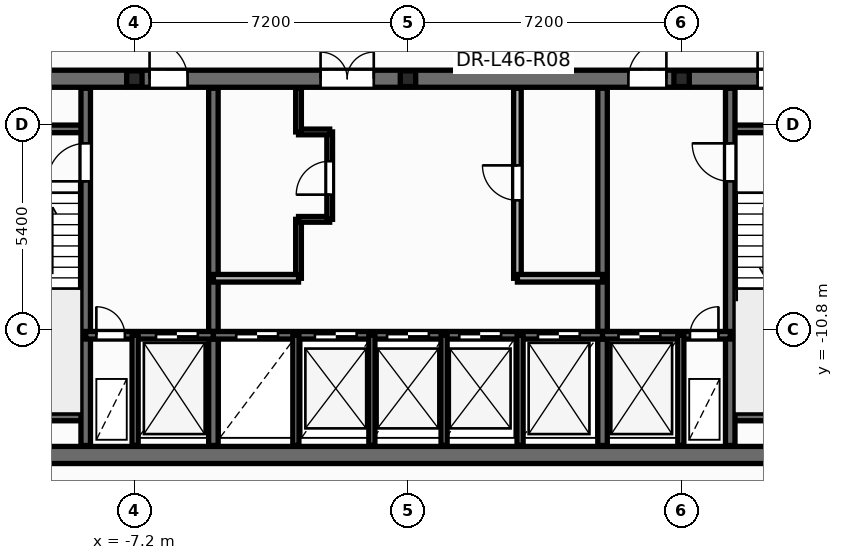
"""IFC4 building model, lengths in metres.
Left out: names, types, materials, properties, quantities, classifications, styles, units other than length and angle.
Written with IfcOpenShell. Run it as: python <this file> out.ifc"""

import sys

from ifc_helpers import new_model, si_unit, direction, frame, frame_2d, origin, origin_2d, place, context, subcontext, project, spatial, rectangle, i_section, extrude, element, fill, save


model = new_model("IFC4")
c1 = context("Model", 3, precision=1e-05, world=origin(), true_north=direction((0.0, 1.0)))
c2 = subcontext(c1, "Body", "Model", "MODEL_VIEW")
j1 = project(units=[si_unit("LENGTHUNIT", "METRE"), si_unit("PLANEANGLEUNIT", "RADIAN")], contexts=[c1])
p1 = place(None, origin())
s1 = spatial("IfcSite", under=j1, at=p1, CompositionType="ELEMENT")
p2 = place(p1, origin())
s2 = spatial("IfcBuilding", under=s1, at=p2, CompositionType="ELEMENT")
p3 = place(p2, frame((0.0, 0.0, 178.5)))
s3 = spatial("IfcBuildingStorey", under=s2, at=p3, CompositionType="ELEMENT", Elevation=178.5)
for number, where, z_axis, x_axis in (
    (1, (-7.2, -4.2, 0.0), (0.0, 0.0, 1.0), (1.0, 0.0, 0.0)),
    (2, (0.0, -4.2, 0.0), (0.0, 0.0, 1.0), (1.0, 0.0, 0.0)),
    (3, (7.2, -4.2, 0.0), (0.0, 0.0, 1.0), (1.0, 0.0, 0.0)),
):
    element("IfcColumn", number, at=place(p3, frame(where, z_axis=z_axis, x_axis=x_axis)), inside=s3, PredefinedType="PILASTER", context=c2, shape_type="SweptSolid", body=[
        extrude(i_section(OverallWidth=0.405, OverallDepth=0.414, WebThickness=0.022, FlangeThickness=0.032, at=origin_2d()), origin(), (0.0, 0.0, 1.0), 3.6),
    ])
p4 = place(p3, frame((-2.88, -9.45, 0.0), z_axis=(0.0, 0.0, 1.0), x_axis=(0.0, 1.0, 0.0)))
e4 = element("IfcWall", 4, at=p4, inside=s3, PredefinedType="PARTITIONING", context=c2, shape_type="SweptSolid", body=[
    extrude(rectangle(XDim=1.55, YDim=0.15, at=frame_2d((0.775, 0.0))), origin(), (0.0, 0.0, 1.0), 3.35),
])
p5 = place(p3, frame((-2.88, -7.9, 0.0), z_axis=(0.0, 0.0, 1.0), x_axis=(1.0, 0.0, 0.0)))
e5 = element("IfcWall", 5, at=p5, inside=s3, PredefinedType="PARTITIONING", context=c2, shape_type="SweptSolid", body=[
    extrude(rectangle(XDim=0.82, YDim=0.15, at=frame_2d((0.41, 0.0))), origin(), (0.0, 0.0, 1.0), 3.35),
])
p6 = place(p3, frame((-2.06, -7.9, 0.0), z_axis=(0.0, 0.0, 1.0), x_axis=(0.0, 1.0, 0.0)))
e6 = element("IfcWall", 6, at=p6, inside=s3, PredefinedType="PARTITIONING", context=c2, shape_type="SweptSolid", body=[
    extrude(rectangle(XDim=2.3, YDim=0.15, at=frame_2d((1.15, 0.0))), origin(), (0.0, 0.0, 1.0), 3.35),
])
p7 = place(p6, frame((0.65, 0.0, 0.0)))
e7 = element("IfcOpeningElement", 7, at=p7, cuts=e6, PredefinedType="OPENING", context=c2, shape_type="SweptSolid", body=[
    extrude(rectangle(XDim=0.886, YDim=2.104, at=frame_2d((0.44, 1.052))), frame((0.0, 0.085, 0.0), z_axis=(0.0, -1.0, 0.0), x_axis=(1.0, 0.0, 0.0)), (0.0, 0.0, 1.0), 0.17),
])
p8 = place(p3, frame((-2.88, -5.6, 0.0), z_axis=(0.0, 0.0, 1.0), x_axis=(1.0, 0.0, 0.0)))
e8 = element("IfcWall", 8, at=p8, inside=s3, PredefinedType="PARTITIONING", context=c2, shape_type="SweptSolid", body=[
    extrude(rectangle(XDim=0.82, YDim=0.15, at=frame_2d((0.41, 0.0))), origin(), (0.0, 0.0, 1.0), 3.35),
])
p9 = place(p3, frame((-2.88, -5.6, 0.0), z_axis=(0.0, 0.0, 1.0), x_axis=(0.0, 1.0, 0.0)))
e9 = element("IfcWall", 9, at=p9, inside=s3, PredefinedType="PARTITIONING", context=c2, shape_type="SweptSolid", body=[
    extrude(rectangle(XDim=1.15, YDim=0.15, at=frame_2d((0.575, 0.0))), origin(), (0.0, 0.0, 1.0), 3.35),
])
p10 = place(p3, frame((-12.65, -14.1, 0.0), z_axis=(0.0, 0.0, 1.0), x_axis=(1.0, 0.0, 0.0)))
e10 = element("IfcWall", 10, at=p10, inside=s3, PredefinedType="SHEAR", context=c2, shape_type="SweptSolid", body=[
    extrude(rectangle(XDim=25.3, YDim=0.45, at=frame_2d((12.65, 0.0))), origin(), (0.0, 0.0, 1.0), 3.6),
])
p11 = place(p3, frame((-12.65, -4.2, 0.0), z_axis=(0.0, 0.0, 1.0), x_axis=(1.0, 0.0, 0.0)))
e11 = element("IfcWall", 11, at=p11, inside=s3, PredefinedType="SHEAR", context=c2, shape_type="SweptSolid", body=[
    extrude(rectangle(XDim=25.3, YDim=0.45, at=frame_2d((12.65, 0.0))), origin(), (0.0, 0.0, 1.0), 3.6),
])
p12 = place(p11, frame((1.85, 0.0, 0.0)))
e12 = element("IfcOpeningElement", 12, at=p12, cuts=e11, PredefinedType="OPENING", context=c2, shape_type="SweptSolid", body=[
    extrude(rectangle(XDim=0.756, YDim=2.054, at=frame_2d((0.375, 1.027))), frame((0.0, 0.235, 0.0), z_axis=(0.0, -1.0, 0.0), x_axis=(1.0, 0.0, 0.0)), (0.0, 0.0, 1.0), 0.47),
])
p13 = place(p11, frame((21.85, 0.0, 0.0)))
e13 = element("IfcOpeningElement", 13, at=p13, cuts=e11, PredefinedType="OPENING", context=c2, shape_type="SweptSolid", body=[
    extrude(rectangle(XDim=0.756, YDim=2.054, at=frame_2d((0.375, 1.027))), frame((0.0, 0.235, 0.0), z_axis=(0.0, -1.0, 0.0), x_axis=(1.0, 0.0, 0.0)), (0.0, 0.0, 1.0), 0.47),
])
p14 = place(p11, frame((23.5, 0.0, 0.0)))
e14 = element("IfcOpeningElement", 14, at=p14, cuts=e11, PredefinedType="OPENING", context=c2, shape_type="SweptSolid", body=[
    extrude(rectangle(XDim=0.756, YDim=2.054, at=frame_2d((0.375, 1.027))), frame((0.0, 0.235, 0.0), z_axis=(0.0, -1.0, 0.0), x_axis=(1.0, 0.0, 0.0)), (0.0, 0.0, 1.0), 0.47),
])
p15 = place(p11, frame((5.85, 0.0, 0.0)))
e15 = element("IfcOpeningElement", 15, at=p15, cuts=e11, PredefinedType="OPENING", context=c2, shape_type="SweptSolid", body=[
    extrude(rectangle(XDim=1.006, YDim=2.104, at=frame_2d((0.5, 1.052))), frame((0.0, 0.235, 0.0), z_axis=(0.0, -1.0, 0.0), x_axis=(1.0, 0.0, 0.0)), (0.0, 0.0, 1.0), 0.47),
])
p16 = place(p11, frame((10.35, 0.0, 0.0)))
e16 = element("IfcOpeningElement", 16, at=p16, cuts=e11, PredefinedType="OPENING", context=c2, shape_type="SweptSolid", body=[
    extrude(rectangle(XDim=1.406, YDim=2.154, at=frame_2d((0.7, 1.077))), frame((0.0, 0.235, 0.0), z_axis=(0.0, -1.0, 0.0), x_axis=(1.0, 0.0, 0.0)), (0.0, 0.0, 1.0), 0.47),
])
p17 = place(p11, frame((18.45, 0.0, 0.0)))
e17 = element("IfcOpeningElement", 17, at=p17, cuts=e11, PredefinedType="OPENING", context=c2, shape_type="SweptSolid", body=[
    extrude(rectangle(XDim=1.006, YDim=2.104, at=frame_2d((0.5, 1.052))), frame((0.0, 0.235, 0.0), z_axis=(0.0, -1.0, 0.0), x_axis=(1.0, 0.0, 0.0)), (0.0, 0.0, 1.0), 0.47),
])
for number, where, z_axis, x_axis in (
    (18, (-12.35, -5.52, 0.0), (0.0, 0.0, 1.0), (1.0, 0.0, 0.0)),
    (19, (-12.35, -13.1, 0.0), (0.0, 0.0, 1.0), (1.0, 0.0, 0.0)),
    (20, (8.48, -5.52, 0.0), (0.0, 0.0, 1.0), (1.0, 0.0, 0.0)),
    (21, (8.48, -13.1, 0.0), (0.0, 0.0, 1.0), (1.0, 0.0, 0.0)),
):
    element("IfcWall", number, at=place(p3, frame(where, z_axis=z_axis, x_axis=x_axis)), inside=s3, PredefinedType="SOLIDWALL", context=c2, shape_type="SweptSolid", body=[
        extrude(rectangle(XDim=3.87, YDim=0.2, at=frame_2d((1.935, 0.0))), origin(), (0.0, 0.0, 1.0), 3.6),
    ])
p18 = place(p3, frame((-8.48, -13.85, 0.0), z_axis=(0.0, 0.0, 1.0), x_axis=(0.0, 1.0, 0.0)))
e22 = element("IfcWall", 22, at=p18, inside=s3, PredefinedType="SHEAR", context=c2, shape_type="SweptSolid", body=[
    extrude(rectangle(XDim=9.4, YDim=0.25, at=frame_2d((4.7, 0.0))), origin(), (0.0, 0.0, 1.0), 3.6),
])
p19 = place(p18, frame((6.95, 0.0, 0.0)))
e23 = element("IfcOpeningElement", 23, at=p19, cuts=e22, PredefinedType="OPENING", context=c2, shape_type="SweptSolid", body=[
    extrude(rectangle(XDim=1.006, YDim=2.104, at=frame_2d((0.5, 1.052))), frame((0.0, 0.135, 0.0), z_axis=(0.0, -1.0, 0.0), x_axis=(1.0, 0.0, 0.0)), (0.0, 0.0, 1.0), 0.27),
])
p20 = place(p3, frame((8.48, -13.85, 0.0), z_axis=(0.0, 0.0, 1.0), x_axis=(0.0, 1.0, 0.0)))
e24 = element("IfcWall", 24, at=p20, inside=s3, PredefinedType="SHEAR", context=c2, shape_type="SweptSolid", body=[
    extrude(rectangle(XDim=9.4, YDim=0.25, at=frame_2d((4.7, 0.0))), origin(), (0.0, 0.0, 1.0), 3.6),
])
p21 = place(p20, frame((6.95, 0.0, 0.0)))
e25 = element("IfcOpeningElement", 25, at=p21, cuts=e24, PredefinedType="OPENING", context=c2, shape_type="SweptSolid", body=[
    extrude(rectangle(XDim=1.006, YDim=2.104, at=frame_2d((0.5, 1.052))), frame((0.0, 0.135, 0.0), z_axis=(0.0, -1.0, 0.0), x_axis=(1.0, 0.0, 0.0)), (0.0, 0.0, 1.0), 0.27),
])
for number, where, z_axis, x_axis in (
    (26, (-5.12, -13.85, 0.0), (0.0, 0.0, 1.0), (0.0, 1.0, 0.0)),
    (27, (5.12, -13.85, 0.0), (0.0, 0.0, 1.0), (0.0, 1.0, 0.0)),
):
    element("IfcWall", number, at=place(p3, frame(where, z_axis=z_axis, x_axis=x_axis)), inside=s3, PredefinedType="SHEAR", context=c2, shape_type="SweptSolid", body=[
        extrude(rectangle(XDim=9.4, YDim=0.25, at=frame_2d((4.7, 0.0))), origin(), (0.0, 0.0, 1.0), 3.6),
    ])
p22 = place(p3, frame((-8.48, -10.95, 0.0), z_axis=(0.0, 0.0, 1.0), x_axis=(1.0, 0.0, 0.0)))
e28 = element("IfcWall", 28, at=p22, inside=s3, PredefinedType="SOLIDWALL", context=c2, shape_type="SweptSolid", body=[
    extrude(rectangle(XDim=3.36, YDim=0.2, at=frame_2d((1.68, 0.0))), origin(), (0.0, 0.0, 1.0), 3.6),
])
p23 = place(p22, frame((0.28, 0.0, 0.0)))
e29 = element("IfcOpeningElement", 29, at=p23, cuts=e28, PredefinedType="OPENING", context=c2, shape_type="SweptSolid", body=[
    extrude(rectangle(XDim=0.756, YDim=2.054, at=frame_2d((0.375, 1.027))), frame((0.0, 0.11, 0.0), z_axis=(0.0, -1.0, 0.0), x_axis=(1.0, 0.0, 0.0)), (0.0, 0.0, 1.0), 0.22),
])
p24 = place(p22, frame((1.85, 0.0, 0.0)))
e30 = element("IfcOpeningElement", 30, at=p24, cuts=e28, PredefinedType="OPENING", context=c2, shape_type="SweptSolid", body=[
    extrude(rectangle(XDim=1.106, YDim=2.104, at=frame_2d((0.55, 1.052))), frame((0.0, 0.11, 0.0), z_axis=(0.0, -1.0, 0.0), x_axis=(1.0, 0.0, 0.0)), (0.0, 0.0, 1.0), 0.22),
])
p25 = place(p3, frame((-5.12, -10.95, 0.0), z_axis=(0.0, 0.0, 1.0), x_axis=(1.0, 0.0, 0.0)))
e31 = element("IfcWall", 31, at=p25, inside=s3, PredefinedType="SOLIDWALL", context=c2, shape_type="SweptSolid", body=[
    extrude(rectangle(XDim=10.24, YDim=0.2, at=frame_2d((5.12, 0.0))), origin(), (0.0, 0.0, 1.0), 3.6),
])
p26 = place(p25, frame((0.6, 0.0, 0.0)))
e32 = element("IfcOpeningElement", 32, at=p26, cuts=e31, PredefinedType="OPENING", context=c2, shape_type="SweptSolid", body=[
    extrude(rectangle(XDim=1.106, YDim=2.104, at=frame_2d((0.55, 1.052))), frame((0.0, 0.11, 0.0), z_axis=(0.0, -1.0, 0.0), x_axis=(1.0, 0.0, 0.0)), (0.0, 0.0, 1.0), 0.22),
])
p27 = place(p25, frame((2.67, 0.0, 0.0)))
e33 = element("IfcOpeningElement", 33, at=p27, cuts=e31, PredefinedType="OPENING", context=c2, shape_type="SweptSolid", body=[
    extrude(rectangle(XDim=1.106, YDim=2.104, at=frame_2d((0.55, 1.052))), frame((0.0, 0.11, 0.0), z_axis=(0.0, -1.0, 0.0), x_axis=(1.0, 0.0, 0.0)), (0.0, 0.0, 1.0), 0.22),
])
p28 = place(p25, frame((4.57, 0.0, 0.0)))
e34 = element("IfcOpeningElement", 34, at=p28, cuts=e31, PredefinedType="OPENING", context=c2, shape_type="SweptSolid", body=[
    extrude(rectangle(XDim=1.106, YDim=2.104, at=frame_2d((0.55, 1.052))), frame((0.0, 0.11, 0.0), z_axis=(0.0, -1.0, 0.0), x_axis=(1.0, 0.0, 0.0)), (0.0, 0.0, 1.0), 0.22),
])
p29 = place(p25, frame((6.47, 0.0, 0.0)))
e35 = element("IfcOpeningElement", 35, at=p29, cuts=e31, PredefinedType="OPENING", context=c2, shape_type="SweptSolid", body=[
    extrude(rectangle(XDim=1.106, YDim=2.104, at=frame_2d((0.55, 1.052))), frame((0.0, 0.11, 0.0), z_axis=(0.0, -1.0, 0.0), x_axis=(1.0, 0.0, 0.0)), (0.0, 0.0, 1.0), 0.22),
])
p30 = place(p25, frame((8.54, 0.0, 0.0)))
e36 = element("IfcOpeningElement", 36, at=p30, cuts=e31, PredefinedType="OPENING", context=c2, shape_type="SweptSolid", body=[
    extrude(rectangle(XDim=1.106, YDim=2.104, at=frame_2d((0.55, 1.052))), frame((0.0, 0.11, 0.0), z_axis=(0.0, -1.0, 0.0), x_axis=(1.0, 0.0, 0.0)), (0.0, 0.0, 1.0), 0.22),
])
p31 = place(p3, frame((5.12, -10.95, 0.0), z_axis=(0.0, 0.0, 1.0), x_axis=(1.0, 0.0, 0.0)))
e37 = element("IfcWall", 37, at=p31, inside=s3, PredefinedType="SOLIDWALL", context=c2, shape_type="SweptSolid", body=[
    extrude(rectangle(XDim=3.36, YDim=0.2, at=frame_2d((1.68, 0.0))), origin(), (0.0, 0.0, 1.0), 3.6),
])
p32 = place(p31, frame((0.42, 0.0, 0.0)))
e38 = element("IfcOpeningElement", 38, at=p32, cuts=e37, PredefinedType="OPENING", context=c2, shape_type="SweptSolid", body=[
    extrude(rectangle(XDim=1.106, YDim=2.104, at=frame_2d((0.55, 1.052))), frame((0.0, 0.11, 0.0), z_axis=(0.0, -1.0, 0.0), x_axis=(1.0, 0.0, 0.0)), (0.0, 0.0, 1.0), 0.22),
])
p33 = place(p31, frame((2.3, 0.0, 0.0)))
e39 = element("IfcOpeningElement", 39, at=p33, cuts=e37, PredefinedType="OPENING", context=c2, shape_type="SweptSolid", body=[
    extrude(rectangle(XDim=0.756, YDim=2.054, at=frame_2d((0.375, 1.027))), frame((0.0, 0.11, 0.0), z_axis=(0.0, -1.0, 0.0), x_axis=(1.0, 0.0, 0.0)), (0.0, 0.0, 1.0), 0.22),
])
for number, where, z_axis, x_axis in (
    (40, (-7.18, -13.85, 0.0), (0.0, 0.0, 1.0), (0.0, 1.0, 0.0)),
    (41, (7.18, -13.85, 0.0), (0.0, 0.0, 1.0), (0.0, 1.0, 0.0)),
    (42, (-2.95, -13.85, 0.0), (0.0, 0.0, 1.0), (0.0, 1.0, 0.0)),
    (43, (2.95, -13.85, 0.0), (0.0, 0.0, 1.0), (0.0, 1.0, 0.0)),
):
    element("IfcWall", number, at=place(p3, frame(where, z_axis=z_axis, x_axis=x_axis)), inside=s3, PredefinedType="PARTITIONING", context=c2, shape_type="SweptSolid", body=[
        extrude(rectangle(XDim=2.9, YDim=0.16, at=frame_2d((1.45, 0.0))), origin(), (0.0, 0.0, 1.0), 2.475),
    ])
p34 = place(p3, frame((-5.12, -9.45, 0.0), z_axis=(0.0, 0.0, 1.0), x_axis=(1.0, 0.0, 0.0)))
e44 = element("IfcWall", 44, at=p34, inside=s3, PredefinedType="SOLIDWALL", context=c2, shape_type="SweptSolid", body=[
    extrude(rectangle(XDim=2.24, YDim=0.2, at=frame_2d((1.12, 0.0))), origin(), (0.0, 0.0, 1.0), 3.35),
])
p35 = place(p3, frame((2.88, -9.45, 0.0), z_axis=(0.0, 0.0, 1.0), x_axis=(0.0, 1.0, 0.0)))
e45 = element("IfcWall", 45, at=p35, inside=s3, PredefinedType="SOLIDWALL", context=c2, shape_type="SweptSolid", body=[
    extrude(rectangle(XDim=5.0, YDim=0.2, at=frame_2d((2.5, 0.0))), origin(), (0.0, 0.0, 1.0), 3.35),
])
p36 = place(p35, frame((2.05, 0.0, 0.0)))
e46 = element("IfcOpeningElement", 46, at=p36, cuts=e45, PredefinedType="OPENING", context=c2, shape_type="SweptSolid", body=[
    extrude(rectangle(XDim=0.926, YDim=2.104, at=frame_2d((0.46, 1.052))), frame((0.0, 0.11, 0.0), z_axis=(0.0, -1.0, 0.0), x_axis=(1.0, 0.0, 0.0)), (0.0, 0.0, 1.0), 0.22),
])
p37 = place(p3, frame((2.88, -9.45, 0.0), z_axis=(0.0, 0.0, 1.0), x_axis=(1.0, 0.0, 0.0)))
e47 = element("IfcWall", 47, at=p37, inside=s3, PredefinedType="SOLIDWALL", context=c2, shape_type="SweptSolid", body=[
    extrude(rectangle(XDim=2.24, YDim=0.2, at=frame_2d((1.12, 0.0))), origin(), (0.0, 0.0, 1.0), 3.35),
])
for number, where, z_axis, x_axis in (
    (48, (-0.95, -13.85, 0.0), (0.0, 0.0, 1.0), (0.0, 1.0, 0.0)),
    (49, (0.95, -13.85, 0.0), (0.0, 0.0, 1.0), (0.0, 1.0, 0.0)),
):
    element("IfcWall", number, at=place(p3, frame(where, z_axis=z_axis, x_axis=x_axis)), inside=s3, PredefinedType="PARTITIONING", context=c2, shape_type="SweptSolid", body=[
        extrude(rectangle(XDim=2.9, YDim=0.16, at=frame_2d((1.45, 0.0))), origin(), (0.0, 0.0, 1.0), 2.475),
    ])
p38 = place(p7, origin())
e50 = element("IfcDoor", 50, at=p38, inside=s3, OperationType="SINGLE_SWING_LEFT", PredefinedType="DOOR", context=c2, shape_type="SweptSolid", body=[
    extrude(rectangle(XDim=0.88, YDim=2.1, at=frame_2d((0.44, 1.05))), frame((0.0, 0.025, 0.0), z_axis=(0.0, -1.0, 0.0), x_axis=(1.0, 0.0, 0.0)), (0.0, 0.0, 1.0), 0.05),
])
fill(e7, e50)
p39 = place(p36, origin())
e51 = element("IfcDoor", 51, at=p39, inside=s3, OperationType="SINGLE_SWING_RIGHT", PredefinedType="DOOR", context=c2, shape_type="SweptSolid", body=[
    extrude(rectangle(XDim=0.92, YDim=2.1, at=frame_2d((0.46, 1.05))), frame((0.0, 0.025, 0.0), z_axis=(0.0, -1.0, 0.0), x_axis=(1.0, 0.0, 0.0)), (0.0, 0.0, 1.0), 0.05),
])
fill(e46, e51)
p40 = place(p19, origin())
e52 = element("IfcDoor", 52, at=p40, inside=s3, OperationType="SINGLE_SWING_LEFT", PredefinedType="DOOR", context=c2, shape_type="SweptSolid", body=[
    extrude(rectangle(XDim=1.0, YDim=2.1, at=frame_2d((0.5, 1.05))), frame((0.0, 0.025, 0.0), z_axis=(0.0, -1.0, 0.0), x_axis=(1.0, 0.0, 0.0)), (0.0, 0.0, 1.0), 0.05),
])
fill(e23, e52)
p41 = place(p21, origin())
e53 = element("IfcDoor", 53, at=p41, inside=s3, OperationType="SINGLE_SWING_RIGHT", PredefinedType="DOOR", context=c2, shape_type="SweptSolid", body=[
    extrude(rectangle(XDim=1.0, YDim=2.1, at=frame_2d((0.5, 1.05))), frame((0.0, 0.025, 0.0), z_axis=(0.0, -1.0, 0.0), x_axis=(1.0, 0.0, 0.0)), (0.0, 0.0, 1.0), 0.05),
])
fill(e25, e53)
p42 = place(p23, origin())
e54 = element("IfcDoor", 54, at=p42, inside=s3, OperationType="SINGLE_SWING_LEFT", PredefinedType="DOOR", context=c2, shape_type="SweptSolid", body=[
    extrude(rectangle(XDim=0.75, YDim=2.05, at=frame_2d((0.375, 1.025))), frame((0.0, 0.025, 0.0), z_axis=(0.0, -1.0, 0.0), x_axis=(1.0, 0.0, 0.0)), (0.0, 0.0, 1.0), 0.05),
])
fill(e29, e54)
p43 = place(p24, origin())
e55 = element("IfcDoor", 55, at=p43, inside=s3, OperationType="DOUBLE_DOOR_SLIDING", PredefinedType="DOOR", context=c2, shape_type="SweptSolid", body=[
    extrude(rectangle(XDim=1.1, YDim=2.1, at=frame_2d((0.55, 1.05))), frame((0.0, 0.025, 0.0), z_axis=(0.0, -1.0, 0.0), x_axis=(1.0, 0.0, 0.0)), (0.0, 0.0, 1.0), 0.05),
])
fill(e30, e55)
p44 = place(p32, origin())
e56 = element("IfcDoor", 56, at=p44, inside=s3, OperationType="DOUBLE_DOOR_SLIDING", PredefinedType="DOOR", context=c2, shape_type="SweptSolid", body=[
    extrude(rectangle(XDim=1.1, YDim=2.1, at=frame_2d((0.55, 1.05))), frame((0.0, 0.025, 0.0), z_axis=(0.0, -1.0, 0.0), x_axis=(1.0, 0.0, 0.0)), (0.0, 0.0, 1.0), 0.05),
])
fill(e38, e56)
p45 = place(p33, origin())
e57 = element("IfcDoor", 57, at=p45, inside=s3, OperationType="SINGLE_SWING_RIGHT", PredefinedType="DOOR", context=c2, shape_type="SweptSolid", body=[
    extrude(rectangle(XDim=0.75, YDim=2.05, at=frame_2d((0.375, 1.025))), frame((0.0, 0.025, 0.0), z_axis=(0.0, -1.0, 0.0), x_axis=(1.0, 0.0, 0.0)), (0.0, 0.0, 1.0), 0.05),
])
fill(e39, e57)
p46 = place(p26, origin())
e58 = element("IfcDoor", 58, at=p46, inside=s3, OperationType="DOUBLE_DOOR_SLIDING", PredefinedType="DOOR", context=c2, shape_type="SweptSolid", body=[
    extrude(rectangle(XDim=1.1, YDim=2.1, at=frame_2d((0.55, 1.05))), frame((0.0, 0.025, 0.0), z_axis=(0.0, -1.0, 0.0), x_axis=(1.0, 0.0, 0.0)), (0.0, 0.0, 1.0), 0.05),
])
fill(e32, e58)
p47 = place(p27, origin())
e59 = element("IfcDoor", 59, at=p47, inside=s3, OperationType="DOUBLE_DOOR_SLIDING", PredefinedType="DOOR", context=c2, shape_type="SweptSolid", body=[
    extrude(rectangle(XDim=1.1, YDim=2.1, at=frame_2d((0.55, 1.05))), frame((0.0, 0.025, 0.0), z_axis=(0.0, -1.0, 0.0), x_axis=(1.0, 0.0, 0.0)), (0.0, 0.0, 1.0), 0.05),
])
fill(e33, e59)
p48 = place(p28, origin())
e60 = element("IfcDoor", 60, at=p48, inside=s3, OperationType="DOUBLE_DOOR_SLIDING", PredefinedType="DOOR", context=c2, shape_type="SweptSolid", body=[
    extrude(rectangle(XDim=1.1, YDim=2.1, at=frame_2d((0.55, 1.05))), frame((0.0, 0.025, 0.0), z_axis=(0.0, -1.0, 0.0), x_axis=(1.0, 0.0, 0.0)), (0.0, 0.0, 1.0), 0.05),
])
fill(e34, e60)
p49 = place(p29, origin())
e61 = element("IfcDoor", 61, at=p49, inside=s3, OperationType="DOUBLE_DOOR_SLIDING", PredefinedType="DOOR", context=c2, shape_type="SweptSolid", body=[
    extrude(rectangle(XDim=1.1, YDim=2.1, at=frame_2d((0.55, 1.05))), frame((0.0, 0.025, 0.0), z_axis=(0.0, -1.0, 0.0), x_axis=(1.0, 0.0, 0.0)), (0.0, 0.0, 1.0), 0.05),
])
fill(e35, e61)
p50 = place(p30, origin())
e62 = element("IfcDoor", 62, at=p50, inside=s3, OperationType="DOUBLE_DOOR_SLIDING", PredefinedType="DOOR", context=c2, shape_type="SweptSolid", body=[
    extrude(rectangle(XDim=1.1, YDim=2.1, at=frame_2d((0.55, 1.05))), frame((0.0, 0.025, 0.0), z_axis=(0.0, -1.0, 0.0), x_axis=(1.0, 0.0, 0.0)), (0.0, 0.0, 1.0), 0.05),
])
fill(e36, e62)
p51 = place(p13, origin())
e63 = element("IfcDoor", 63, at=p51, inside=s3, OperationType="SINGLE_SWING_LEFT", PredefinedType="DOOR", context=c2, shape_type="SweptSolid", body=[
    extrude(rectangle(XDim=0.75, YDim=2.05, at=frame_2d((0.375, 1.025))), frame((0.0, 0.025, 0.0), z_axis=(0.0, -1.0, 0.0), x_axis=(1.0, 0.0, 0.0)), (0.0, 0.0, 1.0), 0.05),
])
fill(e13, e63)
p52 = place(p15, origin())
e64 = element("IfcDoor", 64, at=p52, inside=s3, OperationType="SINGLE_SWING_LEFT", PredefinedType="DOOR", context=c2, shape_type="SweptSolid", body=[
    extrude(rectangle(XDim=1.0, YDim=2.1, at=frame_2d((0.5, 1.05))), frame((0.0, 0.025, 0.0), z_axis=(0.0, -1.0, 0.0), x_axis=(1.0, 0.0, 0.0)), (0.0, 0.0, 1.0), 0.05),
])
fill(e15, e64)
p53 = place(p16, origin())
e65 = element("IfcDoor", 65, at=p53, inside=s3, OperationType="DOUBLE_DOOR_SINGLE_SWING", PredefinedType="DOOR", context=c2, shape_type="SweptSolid", body=[
    extrude(rectangle(XDim=1.4, YDim=2.15, at=frame_2d((0.7, 1.075))), frame((0.0, 0.025, 0.0), z_axis=(0.0, -1.0, 0.0), x_axis=(1.0, 0.0, 0.0)), (0.0, 0.0, 1.0), 0.05),
])
fill(e16, e65)
p54 = place(p17, origin())
e66 = element("IfcDoor", 66, at=p54, inside=s3, OperationType="SINGLE_SWING_RIGHT", PredefinedType="DOOR", context=c2, shape_type="SweptSolid", body=[
    extrude(rectangle(XDim=1.0, YDim=2.1, at=frame_2d((0.5, 1.05))), frame((0.0, 0.025, 0.0), z_axis=(0.0, -1.0, 0.0), x_axis=(1.0, 0.0, 0.0)), (0.0, 0.0, 1.0), 0.05),
])
fill(e17, e66)
save(model, sys.argv[1])
